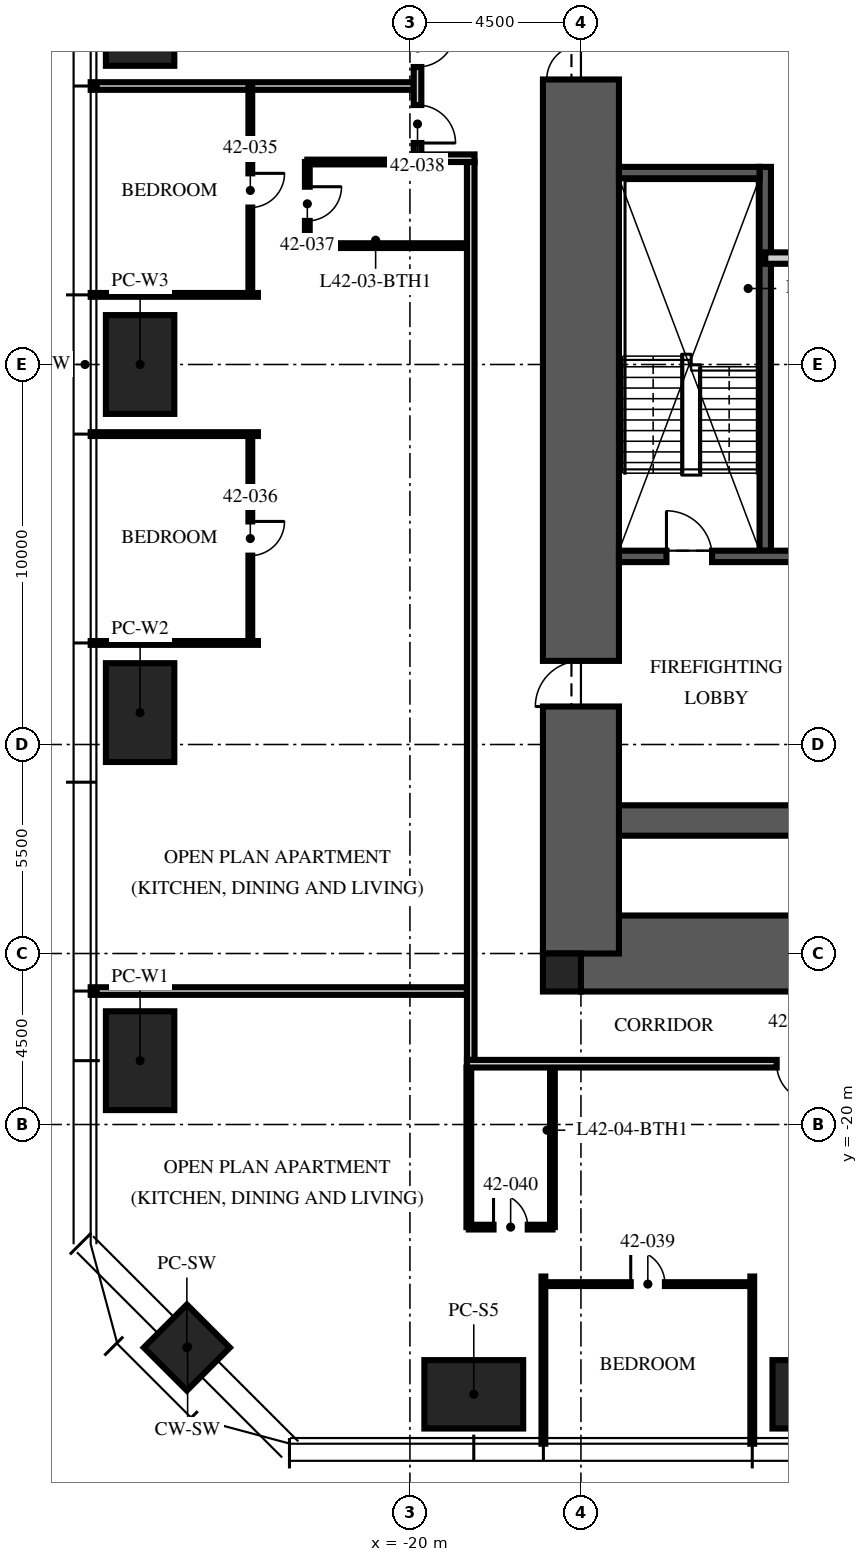
"""IFC4 building model, lengths in metres.
Left out: names, types, materials, properties, quantities, classifications, styles, units other than length and angle.
Written with IfcOpenShell. Run it as: python <this file> out.ifc"""

import sys

from ifc_helpers import new_model, si_unit, direction, frame, frame_2d, origin, origin_2d, place, context, subcontext, project, spatial, rectangle, extrude, element, fill, save


model = new_model("IFC4")
c1 = context("Model", 3, precision=1e-05, world=origin(), true_north=direction((0.0, 1.0)))
c2 = subcontext(c1, "Body", "Model", "MODEL_VIEW")
j1 = project(units=[si_unit("LENGTHUNIT", "METRE"), si_unit("PLANEANGLEUNIT", "RADIAN")], contexts=[c1])
p1 = place(None, origin())
s1 = spatial("IfcSite", under=j1, at=p1, CompositionType="ELEMENT")
p2 = place(p1, origin())
s2 = spatial("IfcBuilding", under=s1, at=p2, CompositionType="ELEMENT")
p3 = place(p2, frame((0.0, 0.0, 167.25)))
s3 = spatial("IfcBuildingStorey", under=s2, at=p3, CompositionType="ELEMENT", Elevation=167.25)
p4 = place(p3, frame((-15.5, -15.5, -0.25), z_axis=(0.0, 0.0, 1.0), x_axis=(1.0, 0.0, 0.0)))
e1 = element("IfcWall", 1, at=p4, inside=s3, PredefinedType="SHEAR", context=c2, shape_type="SweptSolid", body=[
    extrude(rectangle(XDim=31.0, YDim=2.0, at=frame_2d((15.5, 0.0))), origin(), (0.0, 0.0, 1.0), 3.75),
])
p5 = place(p4, frame((10.4, 0.0, 0.25)))
e2 = element("IfcOpeningElement", 2, at=p5, cuts=e1, PredefinedType="OPENING", context=c2, shape_type="SweptSolid", body=[
    extrude(rectangle(XDim=1.1, YDim=2.1, at=frame_2d((0.55, 1.05))), frame((0.0, 1.01, 0.0), z_axis=(0.0, -1.0, 0.0), x_axis=(1.0, 0.0, 0.0)), (0.0, 0.0, 1.0), 2.02),
])
p6 = place(p4, frame((13.5, 0.0, 0.25)))
e3 = element("IfcOpeningElement", 3, at=p6, cuts=e1, PredefinedType="OPENING", context=c2, shape_type="SweptSolid", body=[
    extrude(rectangle(XDim=1.1, YDim=2.1, at=frame_2d((0.55, 1.05))), frame((0.0, 1.01, 0.0), z_axis=(0.0, -1.0, 0.0), x_axis=(1.0, 0.0, 0.0)), (0.0, 0.0, 1.0), 2.02),
])
p7 = place(p4, frame((16.6, 0.0, 0.25)))
e4 = element("IfcOpeningElement", 4, at=p7, cuts=e1, PredefinedType="OPENING", context=c2, shape_type="SweptSolid", body=[
    extrude(rectangle(XDim=1.1, YDim=2.1, at=frame_2d((0.55, 1.05))), frame((0.0, 1.01, 0.0), z_axis=(0.0, -1.0, 0.0), x_axis=(1.0, 0.0, 0.0)), (0.0, 0.0, 1.0), 2.02),
])
p8 = place(p3, frame((-15.5, -12.0, -0.25), z_axis=(0.0, 0.0, 1.0), x_axis=(1.0, 0.0, 0.0)))
e5 = element("IfcWall", 5, at=p8, inside=s3, PredefinedType="SHEAR", context=c2, shape_type="SweptSolid", body=[
    extrude(rectangle(XDim=31.0, YDim=0.8, at=frame_2d((15.5, 0.0))), origin(), (0.0, 0.0, 1.0), 3.75),
])
p9 = place(p3, frame((-15.5, -15.5, -0.25), z_axis=(0.0, 0.0, 1.0), x_axis=(0.0, 1.0, 0.0)))
e6 = element("IfcWall", 6, at=p9, inside=s3, PredefinedType="SHEAR", context=c2, shape_type="SweptSolid", body=[
    extrude(rectangle(XDim=31.0, YDim=2.0, at=frame_2d((15.5, 0.0))), origin(), (0.0, 0.0, 1.0), 3.75),
])
p10 = place(p9, frame((6.5, 0.0, 0.25)))
e7 = element("IfcOpeningElement", 7, at=p10, cuts=e6, PredefinedType="OPENING", context=c2, shape_type="SweptSolid", body=[
    extrude(rectangle(XDim=1.2, YDim=2.1, at=frame_2d((0.6, 1.05))), frame((0.0, 1.01, 0.0), z_axis=(0.0, -1.0, 0.0), x_axis=(1.0, 0.0, 0.0)), (0.0, 0.0, 1.0), 2.02),
])
p11 = place(p9, frame((23.0, 0.0, 0.25)))
e8 = element("IfcOpeningElement", 8, at=p11, cuts=e6, PredefinedType="OPENING", context=c2, shape_type="SweptSolid", body=[
    extrude(rectangle(XDim=1.8, YDim=2.1, at=frame_2d((0.9, 1.05))), frame((0.0, 1.01, 0.0), z_axis=(0.0, -1.0, 0.0), x_axis=(1.0, 0.0, 0.0)), (0.0, 0.0, 1.0), 2.02),
])
p12 = place(p3, frame((-16.0, -16.0, -0.25), z_axis=(0.0, 0.0, 1.0), x_axis=(1.0, 0.0, 0.0)))
e9 = element("IfcColumn", 9, at=p12, inside=s3, PredefinedType="COLUMN", context=c2, shape_type="SweptSolid", body=[
    extrude(rectangle(XDim=1.0, YDim=1.0, at=origin_2d()), origin(), (0.0, 0.0, 1.0), 3.75),
])
for number, where, z_axis, x_axis in (
    (10, (-9.16, -27.1, 0.0), (0.0, 0.0, 1.0), (1.0, 0.0, 0.0)),
    (11, (-18.32, -27.1, 0.0), (0.0, 0.0, 1.0), (1.0, 0.0, 0.0)),
    (12, (-27.1, -18.32, 0.0), (0.0, 0.0, 1.0), (0.0, 1.0, 0.0)),
    (13, (-27.1, -9.16, 0.0), (0.0, 0.0, 1.0), (0.0, 1.0, 0.0)),
    (14, (-27.1, 0.0, 0.0), (0.0, 0.0, 1.0), (0.0, 1.0, 0.0)),
    (15, (-27.1, 9.16, 0.0), (0.0, 0.0, 1.0), (0.0, 1.0, 0.0)),
):
    element("IfcColumn", number, at=place(p3, frame(where, z_axis=z_axis, x_axis=x_axis)), inside=s3, PredefinedType="COLUMN", context=c2, shape_type="SweptSolid", body=[
        extrude(rectangle(XDim=2.6, YDim=1.8, at=origin_2d()), origin(), (0.0, 0.0, 1.0), 3.75),
    ])
p13 = place(p3, frame((-25.87, -25.87, 0.0), z_axis=(0.0, 0.0, 1.0), x_axis=(0.707106781187, -0.707106781187, 0.0)))
e16 = element("IfcColumn", 16, at=p13, inside=s3, PredefinedType="COLUMN", context=c2, shape_type="SweptSolid", body=[
    extrude(rectangle(XDim=1.6, YDim=1.6, at=origin_2d()), origin(), (0.0, 0.0, 1.0), 3.75),
])
p14 = place(p3, frame((-10.65, -4.9, 0.0), z_axis=(0.0, 0.0, 1.0), x_axis=(0.0, 1.0, 0.0)))
e17 = element("IfcWall", 17, at=p14, inside=s3, PredefinedType="SOLIDWALL", context=c2, shape_type="SweptSolid", body=[
    extrude(rectangle(XDim=10.1, YDim=0.3, at=frame_2d((5.05, 0.0))), origin(), (0.0, 0.0, 1.0), 3.5),
])
p15 = place(p3, frame((-14.5, -5.05, 0.0), z_axis=(0.0, 0.0, 1.0), x_axis=(1.0, 0.0, 0.0)))
e18 = element("IfcWall", 18, at=p15, inside=s3, PredefinedType="SOLIDWALL", context=c2, shape_type="SweptSolid", body=[
    extrude(rectangle(XDim=5.7, YDim=0.3, at=frame_2d((2.85, 0.0))), origin(), (0.0, 0.0, 1.0), 3.5),
])
p16 = place(p15, frame((1.25, 0.0, 0.0)))
e19 = element("IfcOpeningElement", 19, at=p16, cuts=e18, PredefinedType="OPENING", context=c2, shape_type="SweptSolid", body=[
    extrude(rectangle(XDim=1.2, YDim=2.1, at=frame_2d((0.6, 1.05))), frame((0.0, 0.16, 0.0), z_axis=(0.0, -1.0, 0.0), x_axis=(1.0, 0.0, 0.0)), (0.0, 0.0, 1.0), 0.32),
])
p17 = place(p3, frame((-14.5, 5.05, 0.0), z_axis=(0.0, 0.0, 1.0), x_axis=(1.0, 0.0, 0.0)))
e20 = element("IfcWall", 20, at=p17, inside=s3, PredefinedType="SOLIDWALL", context=c2, shape_type="SweptSolid", body=[
    extrude(rectangle(XDim=3.7, YDim=0.3, at=frame_2d((1.85, 0.0))), origin(), (0.0, 0.0, 1.0), 3.5),
])
p18 = place(p3, frame((-10.65, 2.8, 0.0), z_axis=(0.0, 0.0, 1.0), x_axis=(1.0, 0.0, 0.0)))
e21 = element("IfcWall", 21, at=p18, inside=s3, PredefinedType="PARTITIONING", context=c2, shape_type="SweptSolid", body=[
    extrude(rectangle(XDim=21.3, YDim=0.3, at=frame_2d((10.65, 0.0))), origin(), (0.0, 0.0, 1.0), 3.5),
])
p19 = place(p18, frame((10.05, 0.0, 0.0)))
e22 = element("IfcOpeningElement", 22, at=p19, cuts=e21, PredefinedType="OPENING", context=c2, shape_type="SweptSolid", body=[
    extrude(rectangle(XDim=1.2, YDim=2.1, at=frame_2d((0.6, 1.05))), frame((0.0, 0.16, 0.0), z_axis=(0.0, -1.0, 0.0), x_axis=(1.0, 0.0, 0.0)), (0.0, 0.0, 1.0), 0.32),
])
p20 = place(p18, frame((1.493, 0.0, 0.0)))
e23 = element("IfcOpeningElement", 23, at=p20, cuts=e21, PredefinedType="OPENING", context=c2, shape_type="SweptSolid", body=[
    extrude(rectangle(XDim=0.9, YDim=2.1, at=frame_2d((0.45, 1.05))), frame((0.0, 0.16, 0.0), z_axis=(0.0, -1.0, 0.0), x_axis=(1.0, 0.0, 0.0)), (0.0, 0.0, 1.0), 0.32),
])
p21 = place(p18, frame((18.836, 0.0, 0.0)))
e24 = element("IfcOpeningElement", 24, at=p21, cuts=e21, PredefinedType="OPENING", context=c2, shape_type="SweptSolid", body=[
    extrude(rectangle(XDim=0.9, YDim=2.1, at=frame_2d((0.45, 1.05))), frame((0.0, 0.16, 0.0), z_axis=(0.0, -1.0, 0.0), x_axis=(1.0, 0.0, 0.0)), (0.0, 0.0, 1.0), 0.32),
])
p22 = place(p3, frame((-19.9, 7.328, 0.0), z_axis=(0.0, 0.0, 1.0), x_axis=(-1.0, 0.0, 0.0)))
e25 = element("IfcWall", 25, at=p22, inside=s3, PredefinedType="PARTITIONING", context=c2, shape_type="SweptSolid", body=[
    extrude(rectangle(XDim=8.5, YDim=0.2, at=frame_2d((4.25, 0.0))), origin(), (0.0, 0.0, 1.0), 2.81),
])
for number, where, z_axis, x_axis in (
    (26, (-24.0, 1.832, 0.0), (0.0, 0.0, 1.0), (-1.0, 0.0, 0.0)),
    (27, (-24.0, -1.832, 0.0), (0.0, 0.0, 1.0), (-1.0, 0.0, 0.0)),
    (28, (-24.0, -7.328, 0.0), (0.0, 0.0, 1.0), (-1.0, 0.0, 0.0)),
):
    element("IfcWall", number, at=place(p3, frame(where, z_axis=z_axis, x_axis=x_axis)), inside=s3, PredefinedType="PARTITIONING", context=c2, shape_type="SweptSolid", body=[
        extrude(rectangle(XDim=4.4, YDim=0.1, at=frame_2d((2.2, 0.0))), origin(), (0.0, 0.0, 1.0), 2.81),
    ])
p23 = place(p3, frame((-18.5, -16.488, 0.0), z_axis=(0.0, 0.0, 1.0), x_axis=(-1.0, 0.0, 0.0)))
e29 = element("IfcWall", 29, at=p23, inside=s3, PredefinedType="PARTITIONING", context=c2, shape_type="SweptSolid", body=[
    extrude(rectangle(XDim=9.9, YDim=0.2, at=frame_2d((4.95, 0.0))), origin(), (0.0, 0.0, 1.0), 2.81),
])
for number, where, z_axis, x_axis in (
    (30, (-16.488, -24.0, 0.0), (0.0, 0.0, 1.0), (0.0, -1.0, 0.0)),
    (31, (-10.992, -24.0, 0.0), (0.0, 0.0, 1.0), (0.0, -1.0, 0.0)),
):
    element("IfcWall", number, at=place(p3, frame(where, z_axis=z_axis, x_axis=x_axis)), inside=s3, PredefinedType="PARTITIONING", context=c2, shape_type="SweptSolid", body=[
        extrude(rectangle(XDim=4.4, YDim=0.1, at=frame_2d((2.2, 0.0))), origin(), (0.0, 0.0, 1.0), 2.81),
    ])
p24 = place(p3, frame((-24.2, 7.328, 0.0), z_axis=(0.0, 0.0, 1.0), x_axis=(0.0, -1.0, 0.0)))
e32 = element("IfcWall", 32, at=p24, inside=s3, PredefinedType="PARTITIONING", context=c2, shape_type="SweptSolid", body=[
    extrude(rectangle(XDim=5.496, YDim=0.1, at=frame_2d((2.748, 0.0))), origin(), (0.0, 0.0, 1.0), 2.81),
])
p25 = place(p24, frame((2.298, 0.0, 0.0)))
e33 = element("IfcOpeningElement", 33, at=p25, cuts=e32, PredefinedType="OPENING", context=c2, shape_type="SweptSolid", body=[
    extrude(rectangle(XDim=0.9, YDim=2.1, at=frame_2d((0.45, 1.05))), frame((0.0, 0.06, 0.0), z_axis=(0.0, -1.0, 0.0), x_axis=(1.0, 0.0, 0.0)), (0.0, 0.0, 1.0), 0.12),
])
p26 = place(p3, frame((-24.2, -1.832, 0.0), z_axis=(0.0, 0.0, 1.0), x_axis=(0.0, -1.0, 0.0)))
e34 = element("IfcWall", 34, at=p26, inside=s3, PredefinedType="PARTITIONING", context=c2, shape_type="SweptSolid", body=[
    extrude(rectangle(XDim=5.496, YDim=0.1, at=frame_2d((2.748, 0.0))), origin(), (0.0, 0.0, 1.0), 2.81),
])
p27 = place(p26, frame((2.298, 0.0, 0.0)))
e35 = element("IfcOpeningElement", 35, at=p27, cuts=e34, PredefinedType="OPENING", context=c2, shape_type="SweptSolid", body=[
    extrude(rectangle(XDim=0.9, YDim=2.1, at=frame_2d((0.45, 1.05))), frame((0.0, 0.06, 0.0), z_axis=(0.0, -1.0, 0.0), x_axis=(1.0, 0.0, 0.0)), (0.0, 0.0, 1.0), 0.12),
])
p28 = place(p3, frame((-22.7, 5.328, 0.0), z_axis=(0.0, 0.0, 1.0), x_axis=(0.0, -1.0, 0.0)))
e36 = element("IfcWall", 36, at=p28, inside=s3, PredefinedType="PARTITIONING", context=c2, shape_type="SweptSolid", body=[
    extrude(rectangle(XDim=2.2, YDim=0.125, at=frame_2d((1.1, 0.0))), origin(), (0.0, 0.0, 1.0), 2.81),
])
p29 = place(p28, frame((0.65, 0.0, 0.0)))
e37 = element("IfcOpeningElement", 37, at=p29, cuts=e36, PredefinedType="OPENING", context=c2, shape_type="SweptSolid", body=[
    extrude(rectangle(XDim=0.9, YDim=2.1, at=frame_2d((0.45, 1.05))), frame((0.0, 0.073, 0.0), z_axis=(0.0, -1.0, 0.0), x_axis=(1.0, 0.0, 0.0)), (0.0, 0.0, 1.0), 0.145),
])
p30 = place(p3, frame((-19.97, 5.328, 0.0), z_axis=(0.0, 0.0, 1.0), x_axis=(-1.0, 0.0, 0.0)))
e38 = element("IfcWall", 38, at=p30, inside=s3, PredefinedType="PARTITIONING", context=c2, shape_type="SweptSolid", body=[
    extrude(rectangle(XDim=2.73, YDim=0.125, at=frame_2d((1.365, 0.0))), origin(), (0.0, 0.0, 1.0), 3.5),
])
p31 = place(p3, frame((-18.5, 3.128, 0.0), z_axis=(0.0, 0.0, 1.0), x_axis=(-1.0, 0.0, 0.0)))
e39 = element("IfcWall", 39, at=p31, inside=s3, PredefinedType="PARTITIONING", context=c2, shape_type="SweptSolid", body=[
    extrude(rectangle(XDim=4.2, YDim=0.125, at=frame_2d((2.1, 0.0))), origin(), (0.0, 0.0, 1.0), 3.5),
])
p32 = place(p3, frame((-16.488, -24.2, 0.0), z_axis=(0.0, 0.0, 1.0), x_axis=(1.0, 0.0, 0.0)))
e40 = element("IfcWall", 40, at=p32, inside=s3, PredefinedType="PARTITIONING", context=c2, shape_type="SweptSolid", body=[
    extrude(rectangle(XDim=5.496, YDim=0.1, at=frame_2d((2.748, 0.0))), origin(), (0.0, 0.0, 1.0), 2.81),
])
p33 = place(p32, frame((2.298, 0.0, 0.0)))
e41 = element("IfcOpeningElement", 41, at=p33, cuts=e40, PredefinedType="OPENING", context=c2, shape_type="SweptSolid", body=[
    extrude(rectangle(XDim=0.9, YDim=2.1, at=frame_2d((0.45, 1.05))), frame((0.0, 0.06, 0.0), z_axis=(0.0, -1.0, 0.0), x_axis=(1.0, 0.0, 0.0)), (0.0, 0.0, 1.0), 0.12),
])
p34 = place(p3, frame((-18.45, -22.7, 0.0), z_axis=(0.0, 0.0, 1.0), x_axis=(1.0, 0.0, 0.0)))
e42 = element("IfcWall", 42, at=p34, inside=s3, PredefinedType="PARTITIONING", context=c2, shape_type="SweptSolid", body=[
    extrude(rectangle(XDim=2.2, YDim=0.125, at=frame_2d((1.1, 0.0))), origin(), (0.0, 0.0, 1.0), 2.7),
])
p35 = place(p34, frame((0.65, 0.0, 0.0)))
e43 = element("IfcOpeningElement", 43, at=p35, cuts=e42, PredefinedType="OPENING", context=c2, shape_type="SweptSolid", body=[
    extrude(rectangle(XDim=0.9, YDim=2.1, at=frame_2d((0.45, 1.05))), frame((0.0, 0.073, 0.0), z_axis=(0.0, -1.0, 0.0), x_axis=(1.0, 0.0, 0.0)), (0.0, 0.0, 1.0), 0.145),
])
p36 = place(p3, frame((-18.45, -18.5, 0.0), z_axis=(0.0, 0.0, 1.0), x_axis=(0.0, -1.0, 0.0)))
e44 = element("IfcWall", 44, at=p36, inside=s3, PredefinedType="PARTITIONING", context=c2, shape_type="SweptSolid", body=[
    extrude(rectangle(XDim=4.2, YDim=0.125, at=frame_2d((2.1, 0.0))), origin(), (0.0, 0.0, 1.0), 2.3),
])
p37 = place(p3, frame((-16.25, -18.5, 0.0), z_axis=(0.0, 0.0, 1.0), x_axis=(0.0, -1.0, 0.0)))
e45 = element("IfcWall", 45, at=p37, inside=s3, PredefinedType="PARTITIONING", context=c2, shape_type="SweptSolid", body=[
    extrude(rectangle(XDim=4.2, YDim=0.125, at=frame_2d((2.1, 0.0))), origin(), (0.0, 0.0, 1.0), 3.5),
])
p38 = place(p3, frame((-18.3, 5.428, 0.0), z_axis=(0.0, 0.0, 1.0), x_axis=(-1.0, 0.0, 0.0)))
e46 = element("IfcWall", 46, at=p38, inside=s3, PredefinedType="PARTITIONING", context=c2, shape_type="SweptSolid", body=[
    extrude(rectangle(XDim=1.6, YDim=0.2, at=frame_2d((0.8, 0.0))), origin(), (0.0, 0.0, 1.0), 3.5),
])
p39 = place(p3, frame((-19.8, 9.128, 0.0), z_axis=(0.0, 0.0, 1.0), x_axis=(0.0, -1.0, 0.0)))
e47 = element("IfcWall", 47, at=p39, inside=s3, PredefinedType="PARTITIONING", context=c2, shape_type="SweptSolid", body=[
    extrude(rectangle(XDim=3.6, YDim=0.2, at=frame_2d((1.8, 0.0))), origin(), (0.0, 0.0, 1.0), 2.7),
])
p40 = place(p39, frame((0.3, 0.0, 0.0)))
e48 = element("IfcOpeningElement", 48, at=p40, cuts=e47, PredefinedType="OPENING", context=c2, shape_type="SweptSolid", body=[
    extrude(rectangle(XDim=1.0, YDim=2.2, at=frame_2d((0.5, 1.1))), frame((0.0, 0.11, 0.0), z_axis=(0.0, -1.0, 0.0), x_axis=(1.0, 0.0, 0.0)), (0.0, 0.0, 1.0), 0.22),
])
p41 = place(p39, frame((2.3, 0.0, 0.0)))
e49 = element("IfcOpeningElement", 49, at=p41, cuts=e47, PredefinedType="OPENING", context=c2, shape_type="SweptSolid", body=[
    extrude(rectangle(XDim=1.0, YDim=2.2, at=frame_2d((0.5, 1.1))), frame((0.0, 0.11, 0.0), z_axis=(0.0, -1.0, 0.0), x_axis=(1.0, 0.0, 0.0)), (0.0, 0.0, 1.0), 0.22),
])
p42 = place(p3, frame((-18.4, 5.328, 0.0), z_axis=(0.0, 0.0, 1.0), x_axis=(0.0, -1.0, 0.0)))
e50 = element("IfcWall", 50, at=p42, inside=s3, PredefinedType="PARTITIONING", context=c2, shape_type="SweptSolid", body=[
    extrude(rectangle(XDim=23.628, YDim=0.2, at=frame_2d((11.814, 0.0))), origin(), (0.0, 0.0, 1.0), 2.3),
])
p43 = place(p3, frame((-8.6, -18.4, 0.0), z_axis=(0.0, 0.0, 1.0), x_axis=(-1.0, 0.0, 0.0)))
e51 = element("IfcWall", 51, at=p43, inside=s3, PredefinedType="PARTITIONING", context=c2, shape_type="SweptSolid", body=[
    extrude(rectangle(XDim=9.9, YDim=0.2, at=frame_2d((4.95, 0.0))), origin(), (0.0, 0.0, 1.0), 2.3),
])
p44 = place(p43, frame((0.75, 0.0, 0.0)))
e52 = element("IfcOpeningElement", 52, at=p44, cuts=e51, PredefinedType="OPENING", context=c2, shape_type="SweptSolid", body=[
    extrude(rectangle(XDim=1.0, YDim=2.2, at=frame_2d((0.5, 1.1))), frame((0.0, 0.11, 0.0), z_axis=(0.0, -1.0, 0.0), x_axis=(1.0, 0.0, 0.0)), (0.0, 0.0, 1.0), 0.22),
])
p45 = place(p16, origin())
e53 = element("IfcDoor", 53, at=p45, inside=s3, OperationType="SINGLE_SWING_LEFT", PredefinedType="DOOR", context=c2, shape_type="SweptSolid", body=[
    extrude(rectangle(XDim=1.2, YDim=2.1, at=frame_2d((0.6, 1.05))), frame((0.0, 0.025, 0.0), z_axis=(0.0, -1.0, 0.0), x_axis=(1.0, 0.0, 0.0)), (0.0, 0.0, 1.0), 0.05),
])
fill(e19, e53)
p46 = place(p10, origin())
e54 = element("IfcDoor", 54, at=p46, inside=s3, OperationType="SINGLE_SWING_LEFT", PredefinedType="DOOR", context=c2, shape_type="SweptSolid", body=[
    extrude(rectangle(XDim=1.2, YDim=2.1, at=frame_2d((0.6, 1.05))), frame((0.0, 0.025, 0.0), z_axis=(0.0, -1.0, 0.0), x_axis=(1.0, 0.0, 0.0)), (0.0, 0.0, 1.0), 0.05),
])
fill(e7, e54)
p47 = place(p11, origin())
e55 = element("IfcDoor", 55, at=p47, inside=s3, OperationType="DOUBLE_DOOR_SINGLE_SWING", PredefinedType="DOOR", context=c2, shape_type="SweptSolid", body=[
    extrude(rectangle(XDim=1.8, YDim=2.1, at=frame_2d((0.9, 1.05))), frame((0.0, 0.025, 0.0), z_axis=(0.0, -1.0, 0.0), x_axis=(1.0, 0.0, 0.0)), (0.0, 0.0, 1.0), 0.05),
])
fill(e8, e55)
p48 = place(p40, origin())
e56 = element("IfcDoor", 56, at=p48, inside=s3, OperationType="SINGLE_SWING_LEFT", PredefinedType="DOOR", context=c2, shape_type="SweptSolid", body=[
    extrude(rectangle(XDim=1.0, YDim=2.2, at=frame_2d((0.5, 1.1))), frame((0.0, 0.025, 0.0), z_axis=(0.0, -1.0, 0.0), x_axis=(1.0, 0.0, 0.0)), (0.0, 0.0, 1.0), 0.05),
])
fill(e48, e56)
p49 = place(p25, origin())
e57 = element("IfcDoor", 57, at=p49, inside=s3, OperationType="SINGLE_SWING_LEFT", PredefinedType="DOOR", context=c2, shape_type="SweptSolid", body=[
    extrude(rectangle(XDim=0.9, YDim=2.1, at=frame_2d((0.45, 1.05))), frame((0.0, 0.025, 0.0), z_axis=(0.0, -1.0, 0.0), x_axis=(1.0, 0.0, 0.0)), (0.0, 0.0, 1.0), 0.05),
])
fill(e33, e57)
p50 = place(p27, origin())
e58 = element("IfcDoor", 58, at=p50, inside=s3, OperationType="SINGLE_SWING_LEFT", PredefinedType="DOOR", context=c2, shape_type="SweptSolid", body=[
    extrude(rectangle(XDim=0.9, YDim=2.1, at=frame_2d((0.45, 1.05))), frame((0.0, 0.025, 0.0), z_axis=(0.0, -1.0, 0.0), x_axis=(1.0, 0.0, 0.0)), (0.0, 0.0, 1.0), 0.05),
])
fill(e35, e58)
p51 = place(p29, origin())
e59 = element("IfcDoor", 59, at=p51, inside=s3, OperationType="SINGLE_SWING_LEFT", PredefinedType="DOOR", context=c2, shape_type="SweptSolid", body=[
    extrude(rectangle(XDim=0.9, YDim=2.1, at=frame_2d((0.45, 1.05))), frame((0.0, 0.025, 0.0), z_axis=(0.0, -1.0, 0.0), x_axis=(1.0, 0.0, 0.0)), (0.0, 0.0, 1.0), 0.05),
])
fill(e37, e59)
p52 = place(p41, origin())
e60 = element("IfcDoor", 60, at=p52, inside=s3, OperationType="SINGLE_SWING_RIGHT", PredefinedType="DOOR", context=c2, shape_type="SweptSolid", body=[
    extrude(rectangle(XDim=1.0, YDim=2.2, at=frame_2d((0.5, 1.1))), frame((0.0, 0.025, 0.0), z_axis=(0.0, -1.0, 0.0), x_axis=(1.0, 0.0, 0.0)), (0.0, 0.0, 1.0), 0.05),
])
fill(e49, e60)
p53 = place(p33, origin())
e61 = element("IfcDoor", 61, at=p53, inside=s3, OperationType="SINGLE_SWING_LEFT", PredefinedType="DOOR", context=c2, shape_type="SweptSolid", body=[
    extrude(rectangle(XDim=0.9, YDim=2.1, at=frame_2d((0.45, 1.05))), frame((0.0, 0.025, 0.0), z_axis=(0.0, -1.0, 0.0), x_axis=(1.0, 0.0, 0.0)), (0.0, 0.0, 1.0), 0.05),
])
fill(e41, e61)
p54 = place(p35, origin())
e62 = element("IfcDoor", 62, at=p54, inside=s3, OperationType="SINGLE_SWING_LEFT", PredefinedType="DOOR", context=c2, shape_type="SweptSolid", body=[
    extrude(rectangle(XDim=0.9, YDim=2.1, at=frame_2d((0.45, 1.05))), frame((0.0, 0.025, 0.0), z_axis=(0.0, -1.0, 0.0), x_axis=(1.0, 0.0, 0.0)), (0.0, 0.0, 1.0), 0.05),
])
fill(e43, e62)
p55 = place(p44, origin())
e63 = element("IfcDoor", 63, at=p55, inside=s3, OperationType="SINGLE_SWING_LEFT", PredefinedType="DOOR", context=c2, shape_type="SweptSolid", body=[
    extrude(rectangle(XDim=1.0, YDim=2.2, at=frame_2d((0.5, 1.1))), frame((0.0, 0.025, 0.0), z_axis=(0.0, -1.0, 0.0), x_axis=(1.0, 0.0, 0.0)), (0.0, 0.0, 1.0), 0.05),
])
fill(e52, e63)
save(model, sys.argv[1])
